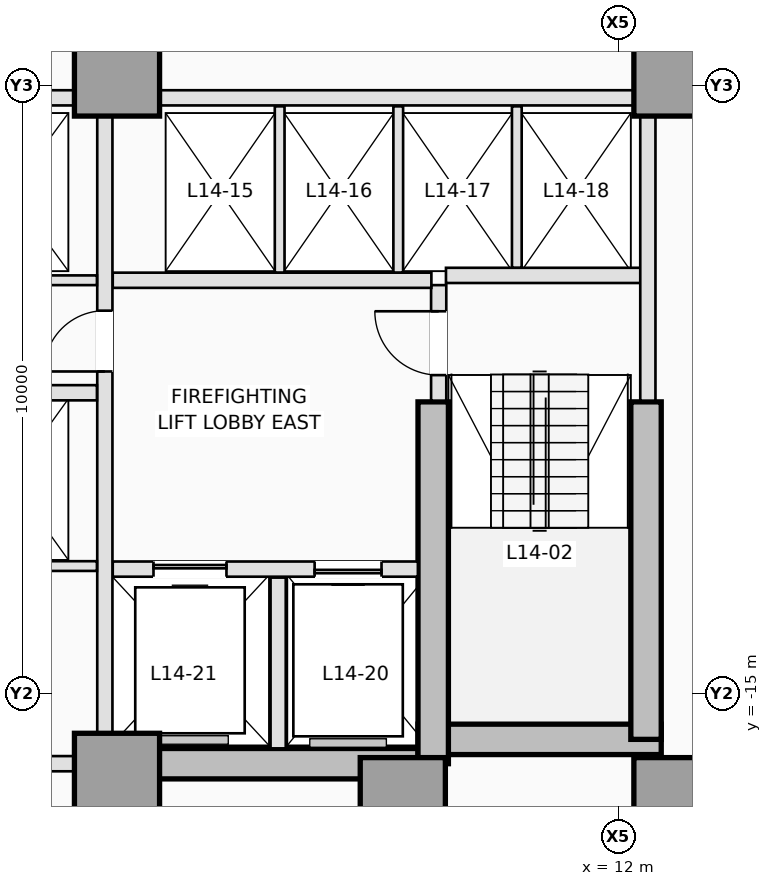
"""IFC4 building model, lengths in metres.
Left out: names, types, materials, properties, quantities, classifications, styles, units other than length and angle.
Written with IfcOpenShell. Run it as: python <this file> out.ifc"""

import sys

from ifc_helpers import new_model, si_unit, direction, frame, frame_2d, origin, origin_2d, place, context, subcontext, project, spatial, rectangle, extrude, element, fill, save


model = new_model("IFC4")
c1 = context("Model", 3, precision=1e-05, world=origin(), true_north=direction((0.0, 1.0)))
c2 = subcontext(c1, "Body", "Model", "MODEL_VIEW")
j1 = project(units=[si_unit("LENGTHUNIT", "METRE"), si_unit("PLANEANGLEUNIT", "RADIAN")], contexts=[c1])
p1 = place(None, origin())
s1 = spatial("IfcSite", under=j1, at=p1, CompositionType="ELEMENT")
p2 = place(p1, origin())
s2 = spatial("IfcBuilding", under=s1, at=p2, CompositionType="ELEMENT")
p3 = place(p2, frame((0.0, 0.0, 55.6)))
s3 = spatial("IfcBuildingStorey", under=s2, at=p3, CompositionType="ELEMENT", Elevation=55.6)
p4 = place(p3, frame((3.75, -16.15, 0.0), z_axis=(0.0, 0.0, 1.0), x_axis=(1.0, 0.0, 0.0)))
e1 = element("IfcWall", 1, at=p4, inside=s3, PredefinedType="SHEAR", context=c2, shape_type="SweptSolid", body=[
    extrude(rectangle(XDim=5.2, YDim=0.5, at=frame_2d((2.6, 0.0))), origin(), (0.0, 0.0, 1.0), 3.5),
])
p5 = place(p3, frame((8.7, -15.75, 0.0), z_axis=(0.0, 0.0, 1.0), x_axis=(1.0, 0.0, 0.0)))
e2 = element("IfcWall", 2, at=p5, inside=s3, PredefinedType="SHEAR", context=c2, shape_type="SweptSolid", body=[
    extrude(rectangle(XDim=4.0, YDim=0.5, at=frame_2d((2.0, 0.0))), origin(), (0.0, 0.0, 1.0), 3.5),
])
p6 = place(p3, frame((12.45, -15.75, 0.0), z_axis=(0.0, 0.0, 1.0), x_axis=(0.0, 1.0, 0.0)))
e3 = element("IfcWall", 3, at=p6, inside=s3, PredefinedType="SHEAR", context=c2, shape_type="SweptSolid", body=[
    extrude(rectangle(XDim=5.55, YDim=0.5, at=frame_2d((2.775, 0.0))), origin(), (0.0, 0.0, 1.0), 3.5),
])
p7 = place(p3, frame((8.95, -16.15, 0.0), z_axis=(0.0, 0.0, 1.0), x_axis=(0.0, 1.0, 0.0)))
e4 = element("IfcWall", 4, at=p7, inside=s3, PredefinedType="SHEAR", context=c2, shape_type="SweptSolid", body=[
    extrude(rectangle(XDim=5.95, YDim=0.5, at=frame_2d((2.975, 0.0))), origin(), (0.0, 0.0, 1.0), 3.5),
])
for number, where, z_axis, x_axis in (
    (5, (3.75, -16.35, 0.0), (0.0, 0.0, 1.0), (1.0, 0.0, 0.0)),
    (6, (8.45, -16.75, 0.0), (0.0, 0.0, 1.0), (1.0, 0.0, 0.0)),
    (7, (12.95, -16.75, 0.0), (0.0, 0.0, 1.0), (1.0, 0.0, 0.0)),
    (8, (3.75, -4.8, 0.0), (0.0, 0.0, 1.0), (1.0, 0.0, 0.0)),
    (9, (12.95, -4.8, 0.0), (0.0, 0.0, 1.0), (1.0, 0.0, 0.0)),
):
    element("IfcColumn", number, at=place(p3, frame(where, z_axis=z_axis, x_axis=x_axis)), inside=s3, PredefinedType="COLUMN", context=c2, shape_type="SweptSolid", body=[
        extrude(rectangle(XDim=1.4, YDim=1.4, at=origin_2d()), origin(), (0.0, 0.0, 1.0), 3.5),
    ])
p8 = place(p3, frame((9.04, -10.18, 0.0), z_axis=(0.0, 0.0, 1.0), x_axis=(0.0, 1.0, 0.0)))
e10 = element("IfcWall", 10, at=p8, inside=s3, PredefinedType="PARTITIONING", context=c2, shape_type="SweptSolid", body=[
    extrude(rectangle(XDim=1.9, YDim=0.25, at=frame_2d((0.95, 0.0))), origin(), (0.0, 0.0, 1.0), 3.25),
])
p9 = place(p8, frame((0.42, 0.0, 0.0)))
e11 = element("IfcOpeningElement", 11, at=p9, cuts=e10, PredefinedType="OPENING", context=c2, shape_type="SweptSolid", body=[
    extrude(rectangle(XDim=1.05, YDim=2.15, at=frame_2d((0.525, 1.075))), frame((0.0, 0.135, 0.0), z_axis=(0.0, -1.0, 0.0), x_axis=(1.0, 0.0, 0.0)), (0.0, 0.0, 1.0), 0.27),
])
p10 = place(p3, frame((9.16, -8.12, 0.0), z_axis=(0.0, 0.0, 1.0), x_axis=(1.0, 0.0, 0.0)))
e12 = element("IfcWall", 12, at=p10, inside=s3, PredefinedType="PARTITIONING", context=c2, shape_type="SweptSolid", body=[
    extrude(rectangle(XDim=3.22, YDim=0.25, at=frame_2d((1.61, 0.0))), origin(), (0.0, 0.0, 1.0), 3.25),
])
p11 = place(p3, frame((12.48, -10.18, 0.0), z_axis=(0.0, 0.0, 1.0), x_axis=(0.0, 1.0, 0.0)))
e13 = element("IfcWall", 13, at=p11, inside=s3, PredefinedType="PARTITIONING", context=c2, shape_type="SweptSolid", body=[
    extrude(rectangle(XDim=4.678, YDim=0.25, at=frame_2d((2.339, 0.0))), origin(), (0.0, 0.0, 1.0), 3.25),
])
p12 = place(p3, frame((3.68, -12.95, 0.0), z_axis=(0.0, 0.0, 1.0), x_axis=(1.0, 0.0, 0.0)))
e14 = element("IfcWall", 14, at=p12, inside=s3, PredefinedType="PARTITIONING", context=c2, shape_type="SweptSolid", body=[
    extrude(rectangle(XDim=5.018, YDim=0.25, at=frame_2d((2.509, 0.0))), origin(), (0.0, 0.0, 1.0), 3.25),
])
p13 = place(p12, frame((3.32, 0.0, 0.0)))
e15 = element("IfcOpeningElement", 15, at=p13, cuts=e14, PredefinedType="OPENING", context=c2, shape_type="SweptSolid", body=[
    extrude(rectangle(XDim=1.1, YDim=2.15, at=frame_2d((0.55, 1.075))), frame((0.0, 0.135, 0.0), z_axis=(0.0, -1.0, 0.0), x_axis=(1.0, 0.0, 0.0)), (0.0, 0.0, 1.0), 0.27),
])
p14 = place(p12, frame((0.67, 0.0, 0.0)))
e16 = element("IfcOpeningElement", 16, at=p14, cuts=e14, PredefinedType="OPENING", context=c2, shape_type="SweptSolid", body=[
    extrude(rectangle(XDim=1.2, YDim=2.15, at=frame_2d((0.6, 1.075))), frame((0.0, 0.135, 0.0), z_axis=(0.0, -1.0, 0.0), x_axis=(1.0, 0.0, 0.0)), (0.0, 0.0, 1.0), 0.27),
])
p15 = place(p3, frame((6.4, -15.898, 0.0), z_axis=(0.0, 0.0, 1.0), x_axis=(0.0, 1.0, 0.0)))
e17 = element("IfcWall", 17, at=p15, inside=s3, PredefinedType="PARTITIONING", context=c2, shape_type="SweptSolid", body=[
    extrude(rectangle(XDim=2.808, YDim=0.25, at=frame_2d((1.404, 0.0))), origin(), (0.0, 0.0, 1.0), 3.25),
])
p16 = place(p3, frame((3.68, -8.2, 0.0), z_axis=(0.0, 0.0, 1.0), x_axis=(1.0, 0.0, 0.0)))
e18 = element("IfcWall", 18, at=p16, inside=s3, PredefinedType="PARTITIONING", context=c2, shape_type="SweptSolid", body=[
    extrude(rectangle(XDim=5.24, YDim=0.25, at=frame_2d((2.62, 0.0))), origin(), (0.0, 0.0, 1.0), 3.25),
])
p17 = place(p3, frame((3.55, -15.648, 0.0), z_axis=(0.0, 0.0, 1.0), x_axis=(0.0, 1.0, 0.0)))
e19 = element("IfcWall", 19, at=p17, inside=s3, PredefinedType="PARTITIONING", context=c2, shape_type="SweptSolid", body=[
    extrude(rectangle(XDim=10.146, YDim=0.25, at=frame_2d((5.073, 0.0))), origin(), (0.0, 0.0, 1.0), 3.25),
])
p18 = place(p17, frame((5.948, 0.0, 0.0)))
e20 = element("IfcOpeningElement", 20, at=p18, cuts=e19, PredefinedType="OPENING", context=c2, shape_type="SweptSolid", body=[
    extrude(rectangle(XDim=1.0, YDim=2.15, at=frame_2d((0.5, 1.075))), frame((0.0, 0.135, 0.0), z_axis=(0.0, -1.0, 0.0), x_axis=(1.0, 0.0, 0.0)), (0.0, 0.0, 1.0), 0.27),
])
p19 = place(p3, frame((4.452, -5.2, 0.0), z_axis=(0.0, 0.0, 1.0), x_axis=(1.0, 0.0, 0.0)))
e21 = element("IfcWall", 21, at=p19, inside=s3, PredefinedType="PARTITIONING", context=c2, shape_type="SweptSolid", body=[
    extrude(rectangle(XDim=7.796, YDim=0.25, at=frame_2d((3.898, 0.0))), origin(), (0.0, 0.0, 1.0), 3.25),
])
p20 = place(p3, frame((0.95, -5.2, 0.0), z_axis=(0.0, 0.0, 1.0), x_axis=(1.0, 0.0, 0.0)))
e22 = element("IfcWall", 22, at=p20, inside=s3, PredefinedType="PARTITIONING", context=c2, shape_type="SweptSolid", body=[
    extrude(rectangle(XDim=2.098, YDim=0.25, at=frame_2d((1.049, 0.0))), origin(), (0.0, 0.0, 1.0), 3.25),
])
for number, where, z_axis, x_axis in (
    (23, (6.425, -8.073, 0.0), (0.0, 0.0, 1.0), (0.0, 1.0, 0.0)),
    (24, (8.375, -8.073, 0.0), (0.0, 0.0, 1.0), (0.0, 1.0, 0.0)),
):
    element("IfcWall", number, at=place(p3, frame(where, z_axis=z_axis, x_axis=x_axis)), inside=s3, PredefinedType="PARTITIONING", context=c2, shape_type="SweptSolid", body=[
        extrude(rectangle(XDim=2.733, YDim=0.16, at=frame_2d((1.366, 0.0))), origin(), (0.0, 0.0, 1.0), 3.25),
    ])
p21 = place(p3, frame((10.325, -7.993, 0.0), z_axis=(0.0, 0.0, 1.0), x_axis=(0.0, 1.0, 0.0)))
e25 = element("IfcWall", 25, at=p21, inside=s3, PredefinedType="PARTITIONING", context=c2, shape_type="SweptSolid", body=[
    extrude(rectangle(XDim=2.653, YDim=0.16, at=frame_2d((1.326, 0.0))), origin(), (0.0, 0.0, 1.0), 3.25),
])
p22 = place(p3, frame((-3.048, -16.15, 0.0), z_axis=(0.0, 0.0, 1.0), x_axis=(1.0, 0.0, 0.0)))
e26 = element("IfcWall", 26, at=p22, inside=s3, PredefinedType="PARTITIONING", context=c2, shape_type="SweptSolid", body=[
    extrude(rectangle(XDim=6.096, YDim=0.25, at=frame_2d((3.048, 0.0))), origin(), (0.0, 0.0, 1.0), 2.3),
])
p23 = place(p3, frame((0.95, -8.2, 0.0), z_axis=(0.0, 0.0, 1.0), x_axis=(1.0, 0.0, 0.0)))
e27 = element("IfcWall", 27, at=p23, inside=s3, PredefinedType="PARTITIONING", context=c2, shape_type="SweptSolid", body=[
    extrude(rectangle(XDim=2.47, YDim=0.16, at=frame_2d((1.235, 0.0))), origin(), (0.0, 0.0, 1.0), 3.25),
])
p24 = place(p3, frame((0.95, -10.05, 0.0), z_axis=(0.0, 0.0, 1.0), x_axis=(1.0, 0.0, 0.0)))
e28 = element("IfcWall", 28, at=p24, inside=s3, PredefinedType="PARTITIONING", context=c2, shape_type="SweptSolid", body=[
    extrude(rectangle(XDim=2.47, YDim=0.25, at=frame_2d((1.235, 0.0))), origin(), (0.0, 0.0, 1.0), 3.25),
])
p25 = place(p3, frame((-3.42, -12.9, 0.0), z_axis=(0.0, 0.0, 1.0), x_axis=(1.0, 0.0, 0.0)))
e29 = element("IfcWall", 29, at=p25, inside=s3, PredefinedType="PARTITIONING", context=c2, shape_type="SweptSolid", body=[
    extrude(rectangle(XDim=6.84, YDim=0.16, at=frame_2d((3.42, 0.0))), origin(), (0.0, 0.0, 1.0), 3.25),
])
p26 = place(p25, frame((2.98, 0.0, 0.0)))
e30 = element("IfcOpeningElement", 30, at=p26, cuts=e29, PredefinedType="OPENING", context=c2, shape_type="SweptSolid", body=[
    extrude(rectangle(XDim=0.88, YDim=2.12, at=frame_2d((0.44, 1.06))), frame((0.0, 0.09, 0.0), z_axis=(0.0, -1.0, 0.0), x_axis=(1.0, 0.0, 0.0)), (0.0, 0.0, 1.0), 0.18),
])
p27 = place(p13, origin())
e31 = element("IfcDoor", 31, at=p27, inside=s3, OperationType="SLIDING_TO_RIGHT", PredefinedType="DOOR", context=c2, shape_type="SweptSolid", body=[
    extrude(rectangle(XDim=1.1, YDim=2.15, at=frame_2d((0.55, 1.075))), frame((0.0, 0.025, 0.0), z_axis=(0.0, -1.0, 0.0), x_axis=(1.0, 0.0, 0.0)), (0.0, 0.0, 1.0), 0.05),
])
fill(e15, e31)
p28 = place(p14, origin())
e32 = element("IfcDoor", 32, at=p28, inside=s3, OperationType="SLIDING_TO_LEFT", PredefinedType="DOOR", context=c2, shape_type="SweptSolid", body=[
    extrude(rectangle(XDim=1.2, YDim=2.15, at=frame_2d((0.6, 1.075))), frame((0.0, 0.025, 0.0), z_axis=(0.0, -1.0, 0.0), x_axis=(1.0, 0.0, 0.0)), (0.0, 0.0, 1.0), 0.05),
])
fill(e16, e32)
p29 = place(p9, origin())
e33 = element("IfcDoor", 33, at=p29, inside=s3, OperationType="SINGLE_SWING_RIGHT", PredefinedType="DOOR", context=c2, shape_type="SweptSolid", body=[
    extrude(rectangle(XDim=1.05, YDim=2.15, at=frame_2d((0.525, 1.075))), frame((0.0, 0.025, 0.0), z_axis=(0.0, -1.0, 0.0), x_axis=(1.0, 0.0, 0.0)), (0.0, 0.0, 1.0), 0.05),
])
fill(e11, e33)
p30 = place(p18, origin())
e34 = element("IfcDoor", 34, at=p30, inside=s3, OperationType="SINGLE_SWING_LEFT", PredefinedType="DOOR", context=c2, shape_type="SweptSolid", body=[
    extrude(rectangle(XDim=1.0, YDim=2.15, at=frame_2d((0.5, 1.075))), frame((0.0, 0.025, 0.0), z_axis=(0.0, -1.0, 0.0), x_axis=(1.0, 0.0, 0.0)), (0.0, 0.0, 1.0), 0.05),
])
fill(e20, e34)
save(model, sys.argv[1])
